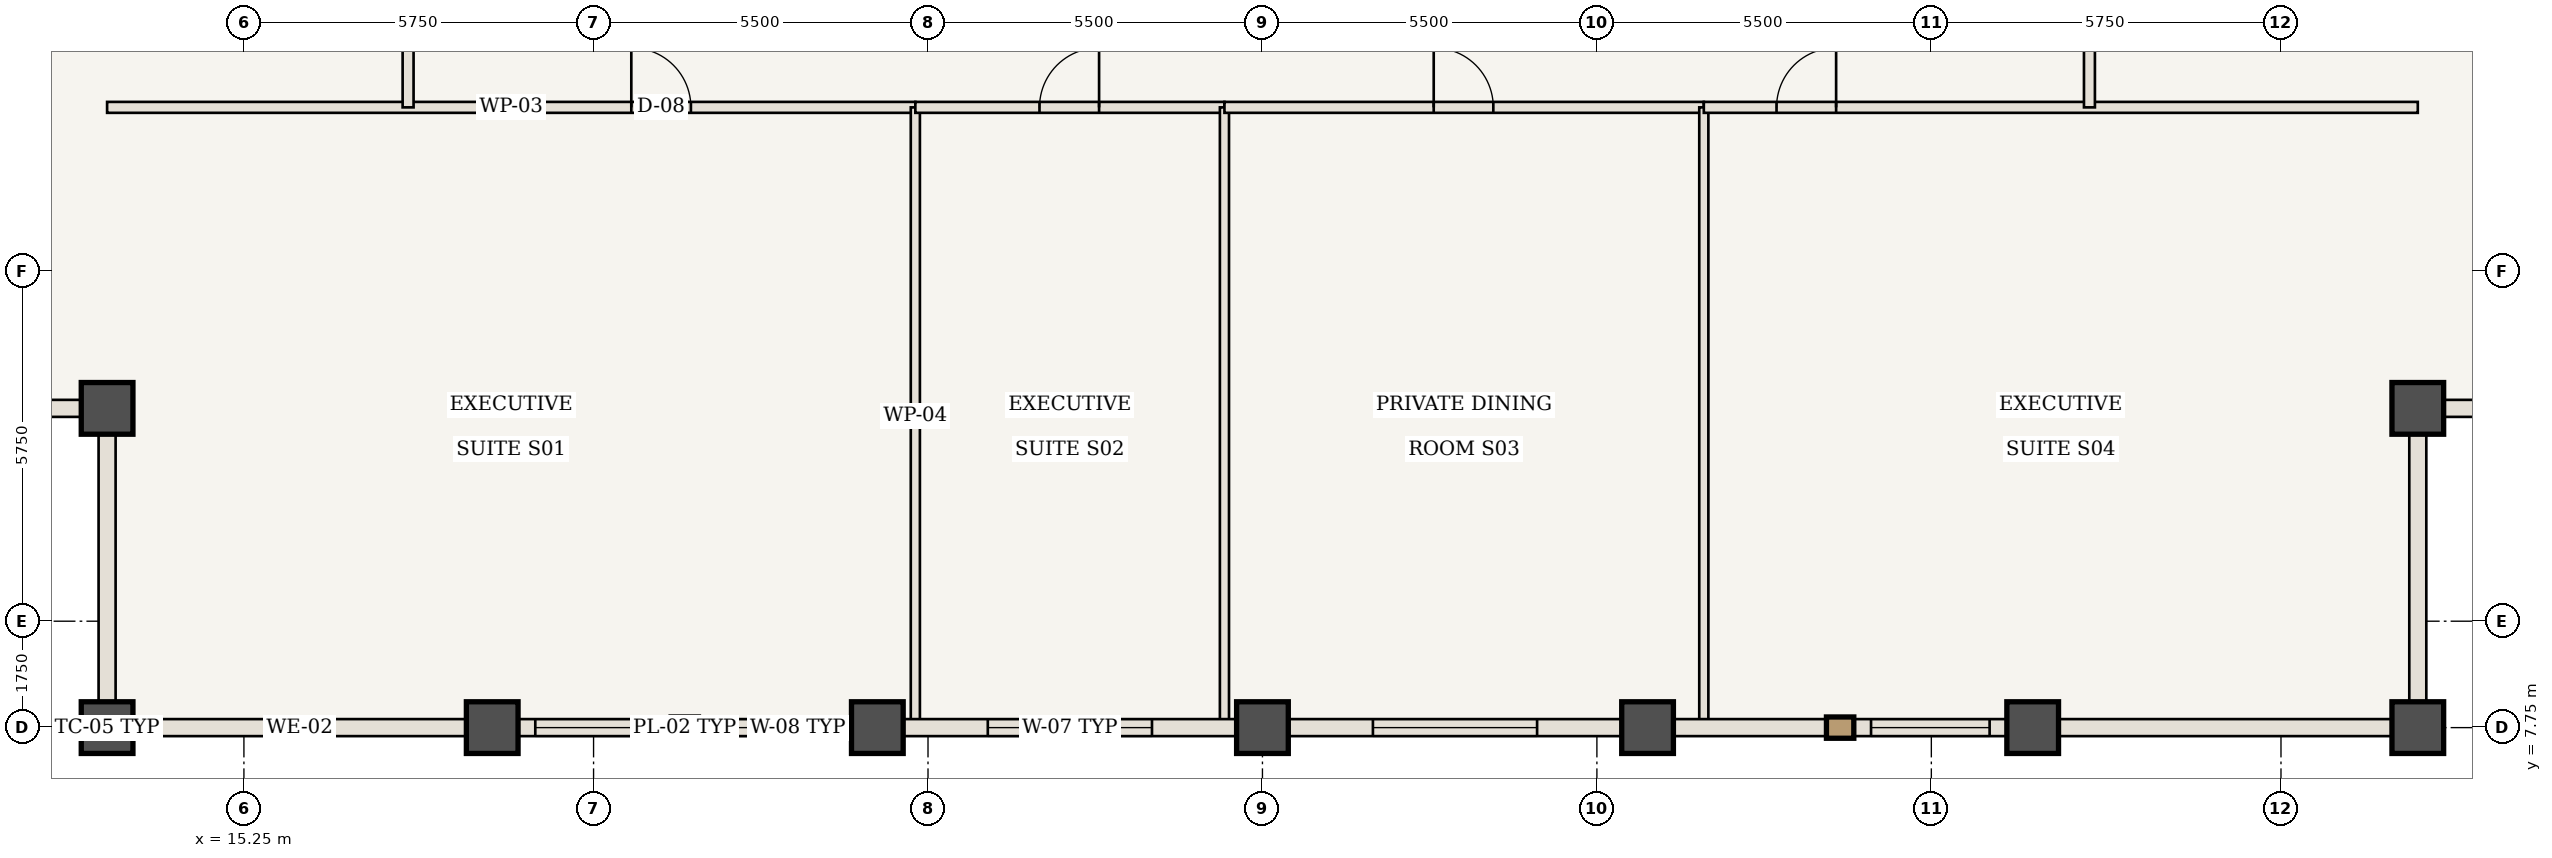
"""IFC4 building model, lengths in metres.
Left out: names, types, materials, properties, quantities, classifications, styles, units other than length and angle.
Written with IfcOpenShell. Run it as: python <this file> out.ifc"""

import sys

from ifc_helpers import new_model, si_unit, direction, frame, frame_2d, origin, origin_2d, place, context, subcontext, project, spatial, rectangle, extrude, element, fill, save


model = new_model("IFC4")
c1 = context("Model", 3, precision=1e-05, world=origin(), true_north=direction((0.0, 1.0)))
c2 = subcontext(c1, "Body", "Model", "MODEL_VIEW")
j1 = project(units=[si_unit("LENGTHUNIT", "METRE"), si_unit("PLANEANGLEUNIT", "RADIAN")], contexts=[c1])
p1 = place(None, origin())
s1 = spatial("IfcSite", under=j1, at=p1, CompositionType="ELEMENT")
p2 = place(p1, origin())
s2 = spatial("IfcBuilding", under=s1, at=p2, CompositionType="ELEMENT")
p3 = place(p2, frame((0.0, 0.0, 225.4)))
s3 = spatial("IfcBuildingStorey", under=s2, at=p3, CompositionType="ELEMENT", Elevation=225.4)
for number, where, z_axis, x_axis in (
    (1, (13.0, 7.75, 0.0), (0.0, 0.0, 1.0), (1.0, 0.0, 0.0)),
    (2, (13.0, 13.0, 0.0), (0.0, 0.0, 1.0), (1.0, 0.0, 0.0)),
    (3, (51.0, 7.75, 0.0), (0.0, 0.0, 1.0), (1.0, 0.0, 0.0)),
    (4, (51.0, 13.0, 0.0), (0.0, 0.0, 1.0), (1.0, 0.0, 0.0)),
    (5, (19.333, 7.75, 0.0), (0.0, 0.0, 1.0), (1.0, 0.0, 0.0)),
    (6, (25.667, 7.75, 0.0), (0.0, 0.0, 1.0), (1.0, 0.0, 0.0)),
    (7, (32.0, 7.75, 0.0), (0.0, 0.0, 1.0), (1.0, 0.0, 0.0)),
    (8, (38.333, 7.75, 0.0), (0.0, 0.0, 1.0), (1.0, 0.0, 0.0)),
    (9, (44.667, 7.75, 0.0), (0.0, 0.0, 1.0), (1.0, 0.0, 0.0)),
):
    element("IfcColumn", number, at=place(p3, frame(where, z_axis=z_axis, x_axis=x_axis)), inside=s3, PredefinedType="COLUMN", context=c2, shape_type="SweptSolid", body=[
        extrude(rectangle(XDim=0.85, YDim=0.85, at=origin_2d()), origin(), (0.0, 0.0, 1.0), 3.85),
    ])
p4 = place(p3, frame((13.0, 17.95, 0.0), z_axis=(0.0, 0.0, 1.0), x_axis=(1.0, 0.0, 0.0)))
e10 = element("IfcWall", 10, at=p4, inside=s3, PredefinedType="STANDARD", context=c2, shape_type="SweptSolid", body=[
    extrude(rectangle(XDim=13.292, YDim=0.18, at=frame_2d((6.646, 0.0))), origin(), (0.0, 0.0, 1.0), 3.685),
])
p5 = place(p4, frame((8.621, 0.0, 0.0)))
e11 = element("IfcOpeningElement", 11, at=p5, cuts=e10, PredefinedType="OPENING", context=c2, shape_type="SweptSolid", body=[
    extrude(rectangle(XDim=0.98, YDim=2.2, at=frame_2d((0.49, 1.1))), frame((0.0, 0.1, 0.0), z_axis=(0.0, -1.0, 0.0), x_axis=(1.0, 0.0, 0.0)), (0.0, 0.0, 1.0), 0.2),
])
p6 = place(p3, frame((26.292, 7.81, 0.0), z_axis=(0.0, 0.0, 1.0), x_axis=(0.0, 1.0, 0.0)))
e12 = element("IfcWall", 12, at=p6, inside=s3, PredefinedType="STANDARD", context=c2, shape_type="SweptSolid", body=[
    extrude(rectangle(XDim=10.14, YDim=0.15, at=frame_2d((5.07, 0.0))), origin(), (0.0, 0.0, 1.0), 3.685),
])
p7 = place(p3, frame((26.292, 17.95, 0.0), z_axis=(0.0, 0.0, 1.0), x_axis=(1.0, 0.0, 0.0)))
e13 = element("IfcWall", 13, at=p7, inside=s3, PredefinedType="STANDARD", context=c2, shape_type="SweptSolid", body=[
    extrude(rectangle(XDim=5.083, YDim=0.18, at=frame_2d((2.542, 0.0))), origin(), (0.0, 0.0, 1.0), 3.685),
])
p8 = place(p7, frame((2.042, 0.0, 0.0)))
e14 = element("IfcOpeningElement", 14, at=p8, cuts=e13, PredefinedType="OPENING", context=c2, shape_type="SweptSolid", body=[
    extrude(rectangle(XDim=0.98, YDim=2.2, at=frame_2d((0.49, 1.1))), frame((0.0, 0.1, 0.0), z_axis=(0.0, -1.0, 0.0), x_axis=(1.0, 0.0, 0.0)), (0.0, 0.0, 1.0), 0.2),
])
p9 = place(p3, frame((31.375, 7.81, 0.0), z_axis=(0.0, 0.0, 1.0), x_axis=(0.0, 1.0, 0.0)))
e15 = element("IfcWall", 15, at=p9, inside=s3, PredefinedType="STANDARD", context=c2, shape_type="SweptSolid", body=[
    extrude(rectangle(XDim=10.14, YDim=0.15, at=frame_2d((5.07, 0.0))), origin(), (0.0, 0.0, 1.0), 3.685),
])
p10 = place(p3, frame((31.375, 17.95, 0.0), z_axis=(0.0, 0.0, 1.0), x_axis=(1.0, 0.0, 0.0)))
e16 = element("IfcWall", 16, at=p10, inside=s3, PredefinedType="STANDARD", context=c2, shape_type="SweptSolid", body=[
    extrude(rectangle(XDim=7.883, YDim=0.18, at=frame_2d((3.942, 0.0))), origin(), (0.0, 0.0, 1.0), 3.685),
])
p11 = place(p10, frame((3.442, 0.0, 0.0)))
e17 = element("IfcOpeningElement", 17, at=p11, cuts=e16, PredefinedType="OPENING", context=c2, shape_type="SweptSolid", body=[
    extrude(rectangle(XDim=0.98, YDim=2.2, at=frame_2d((0.49, 1.1))), frame((0.0, 0.1, 0.0), z_axis=(0.0, -1.0, 0.0), x_axis=(1.0, 0.0, 0.0)), (0.0, 0.0, 1.0), 0.2),
])
p12 = place(p3, frame((39.258, 7.81, 0.0), z_axis=(0.0, 0.0, 1.0), x_axis=(0.0, 1.0, 0.0)))
e18 = element("IfcWall", 18, at=p12, inside=s3, PredefinedType="STANDARD", context=c2, shape_type="SweptSolid", body=[
    extrude(rectangle(XDim=10.14, YDim=0.15, at=frame_2d((5.07, 0.0))), origin(), (0.0, 0.0, 1.0), 3.685),
])
p13 = place(p3, frame((39.258, 17.95, 0.0), z_axis=(0.0, 0.0, 1.0), x_axis=(1.0, 0.0, 0.0)))
e19 = element("IfcWall", 19, at=p13, inside=s3, PredefinedType="STANDARD", context=c2, shape_type="SweptSolid", body=[
    extrude(rectangle(XDim=11.742, YDim=0.18, at=frame_2d((5.871, 0.0))), origin(), (0.0, 0.0, 1.0), 3.685),
])
p14 = place(p13, frame((1.196, 0.0, 0.0)))
e20 = element("IfcOpeningElement", 20, at=p14, cuts=e19, PredefinedType="OPENING", context=c2, shape_type="SweptSolid", body=[
    extrude(rectangle(XDim=0.98, YDim=2.2, at=frame_2d((0.49, 1.1))), frame((0.0, 0.1, 0.0), z_axis=(0.0, -1.0, 0.0), x_axis=(1.0, 0.0, 0.0)), (0.0, 0.0, 1.0), 0.2),
])
p15 = place(p3, frame((17.95, 17.95, 0.0), z_axis=(0.0, 0.0, 1.0), x_axis=(0.0, 1.0, 0.0)))
e21 = element("IfcWall", 21, at=p15, inside=s3, PredefinedType="STANDARD", context=c2, shape_type="SweptSolid", body=[
    extrude(rectangle(XDim=6.642, YDim=0.18, at=frame_2d((3.321, 0.0))), origin(), (0.0, 0.0, 1.0), 3.685),
])
p16 = place(p15, frame((4.271, 0.0, 0.0)))
e22 = element("IfcOpeningElement", 22, at=p16, cuts=e21, PredefinedType="OPENING", context=c2, shape_type="SweptSolid", body=[
    extrude(rectangle(XDim=0.98, YDim=2.2, at=frame_2d((0.49, 1.1))), frame((0.0, 0.1, 0.0), z_axis=(0.0, -1.0, 0.0), x_axis=(1.0, 0.0, 0.0)), (0.0, 0.0, 1.0), 0.2),
])
p17 = place(p3, frame((45.6, 17.95, 0.0), z_axis=(0.0, 0.0, 1.0), x_axis=(0.0, 1.0, 0.0)))
e23 = element("IfcWall", 23, at=p17, inside=s3, PredefinedType="STANDARD", context=c2, shape_type="SweptSolid", body=[
    extrude(rectangle(XDim=13.1, YDim=0.18, at=frame_2d((6.55, 0.0))), origin(), (0.0, 0.0, 1.0), 3.685),
])
p18 = place(p17, frame((6.05, 0.0, 0.0)))
e24 = element("IfcOpeningElement", 24, at=p18, cuts=e23, PredefinedType="OPENING", context=c2, shape_type="SweptSolid", body=[
    extrude(rectangle(XDim=0.98, YDim=2.2, at=frame_2d((0.49, 1.1))), frame((0.0, 0.1, 0.0), z_axis=(0.0, -1.0, 0.0), x_axis=(1.0, 0.0, 0.0)), (0.0, 0.0, 1.0), 0.2),
])
p19 = place(p3, frame((19.333, 7.75, 0.0), z_axis=(0.0, 0.0, 1.0), x_axis=(-1.0, 0.0, 0.0)))
e25 = element("IfcWall", 25, at=p19, inside=s3, PredefinedType="USERDEFINED", context=c2, shape_type="SweptSolid", body=[
    extrude(rectangle(XDim=6.333, YDim=0.28, at=frame_2d((3.167, 0.0))), origin(), (0.0, 0.0, 1.0), 2.985),
])
p20 = place(p3, frame((25.667, 7.75, 0.0), z_axis=(0.0, 0.0, 1.0), x_axis=(-1.0, 0.0, 0.0)))
e26 = element("IfcWall", 26, at=p20, inside=s3, PredefinedType="USERDEFINED", context=c2, shape_type="SweptSolid", body=[
    extrude(rectangle(XDim=6.333, YDim=0.28, at=frame_2d((3.167, 0.0))), origin(), (0.0, 0.0, 1.0), 2.985),
])
p21 = place(p20, frame((0.708, 0.0, 0.85)))
e27 = element("IfcOpeningElement", 27, at=p21, cuts=e26, PredefinedType="OPENING", context=c2, shape_type="SweptSolid", body=[
    extrude(rectangle(XDim=1.95, YDim=1.935, at=frame_2d((0.975, 0.968))), frame((0.0, 0.15, 0.0), z_axis=(0.0, -1.0, 0.0), x_axis=(1.0, 0.0, 0.0)), (0.0, 0.0, 1.0), 0.3),
])
p22 = place(p20, frame((3.675, 0.0, 0.85)))
e28 = element("IfcOpeningElement", 28, at=p22, cuts=e26, PredefinedType="OPENING", context=c2, shape_type="SweptSolid", body=[
    extrude(rectangle(XDim=1.95, YDim=1.935, at=frame_2d((0.975, 0.968))), frame((0.0, 0.15, 0.0), z_axis=(0.0, -1.0, 0.0), x_axis=(1.0, 0.0, 0.0)), (0.0, 0.0, 1.0), 0.3),
])
p23 = place(p3, frame((32.0, 7.75, 0.0), z_axis=(0.0, 0.0, 1.0), x_axis=(-1.0, 0.0, 0.0)))
e29 = element("IfcWall", 29, at=p23, inside=s3, PredefinedType="USERDEFINED", context=c2, shape_type="SweptSolid", body=[
    extrude(rectangle(XDim=6.333, YDim=0.28, at=frame_2d((3.167, 0.0))), origin(), (0.0, 0.0, 1.0), 2.985),
])
p24 = place(p23, frame((1.817, 0.0, 0.85)))
e30 = element("IfcOpeningElement", 30, at=p24, cuts=e29, PredefinedType="OPENING", context=c2, shape_type="SweptSolid", body=[
    extrude(rectangle(XDim=2.7, YDim=1.935, at=frame_2d((1.35, 0.968))), frame((0.0, 0.15, 0.0), z_axis=(0.0, -1.0, 0.0), x_axis=(1.0, 0.0, 0.0)), (0.0, 0.0, 1.0), 0.3),
])
p25 = place(p3, frame((38.333, 7.75, 0.0), z_axis=(0.0, 0.0, 1.0), x_axis=(-1.0, 0.0, 0.0)))
e31 = element("IfcWall", 31, at=p25, inside=s3, PredefinedType="USERDEFINED", context=c2, shape_type="SweptSolid", body=[
    extrude(rectangle(XDim=6.333, YDim=0.28, at=frame_2d((3.167, 0.0))), origin(), (0.0, 0.0, 1.0), 2.985),
])
p26 = place(p25, frame((1.817, 0.0, 0.85)))
e32 = element("IfcOpeningElement", 32, at=p26, cuts=e31, PredefinedType="OPENING", context=c2, shape_type="SweptSolid", body=[
    extrude(rectangle(XDim=2.7, YDim=1.935, at=frame_2d((1.35, 0.968))), frame((0.0, 0.15, 0.0), z_axis=(0.0, -1.0, 0.0), x_axis=(1.0, 0.0, 0.0)), (0.0, 0.0, 1.0), 0.3),
])
p27 = place(p3, frame((44.667, 7.75, 0.0), z_axis=(0.0, 0.0, 1.0), x_axis=(-1.0, 0.0, 0.0)))
e33 = element("IfcWall", 33, at=p27, inside=s3, PredefinedType="USERDEFINED", context=c2, shape_type="SweptSolid", body=[
    extrude(rectangle(XDim=6.333, YDim=0.28, at=frame_2d((3.167, 0.0))), origin(), (0.0, 0.0, 1.0), 2.985),
])
p28 = place(p27, frame((0.708, 0.0, 0.85)))
e34 = element("IfcOpeningElement", 34, at=p28, cuts=e33, PredefinedType="OPENING", context=c2, shape_type="SweptSolid", body=[
    extrude(rectangle(XDim=1.95, YDim=1.935, at=frame_2d((0.975, 0.968))), frame((0.0, 0.15, 0.0), z_axis=(0.0, -1.0, 0.0), x_axis=(1.0, 0.0, 0.0)), (0.0, 0.0, 1.0), 0.3),
])
p29 = place(p3, frame((51.0, 7.75, 0.0), z_axis=(0.0, 0.0, 1.0), x_axis=(-1.0, 0.0, 0.0)))
e35 = element("IfcWall", 35, at=p29, inside=s3, PredefinedType="USERDEFINED", context=c2, shape_type="SweptSolid", body=[
    extrude(rectangle(XDim=6.333, YDim=0.28, at=frame_2d((3.167, 0.0))), origin(), (0.0, 0.0, 1.0), 2.985),
])
for number, where, z_axis, x_axis in (
    (36, (13.0, 7.75, 0.0), (0.0, 0.0, 1.0), (0.0, 1.0, 0.0)),
    (37, (13.0, 13.0, 0.0), (0.0, 0.0, 1.0), (-1.0, 0.0, 0.0)),
    (38, (51.0, 13.0, 0.0), (0.0, 0.0, 1.0), (0.0, -1.0, 0.0)),
    (39, (56.25, 13.0, 0.0), (0.0, 0.0, 1.0), (-1.0, 0.0, 0.0)),
):
    element("IfcWall", number, at=place(p3, frame(where, z_axis=z_axis, x_axis=x_axis)), inside=s3, PredefinedType="USERDEFINED", context=c2, shape_type="SweptSolid", body=[
        extrude(rectangle(XDim=5.25, YDim=0.28, at=frame_2d((2.625, 0.0))), origin(), (0.0, 0.0, 1.0), 2.985),
    ])
p30 = place(p5, origin())
e40 = element("IfcDoor", 40, at=p30, inside=s3, OperationType="SINGLE_SWING_LEFT", PredefinedType="DOOR", context=c2, shape_type="SweptSolid", body=[
    extrude(rectangle(XDim=0.98, YDim=2.2, at=frame_2d((0.49, 1.1))), frame((0.0, 0.025, 0.0), z_axis=(0.0, -1.0, 0.0), x_axis=(1.0, 0.0, 0.0)), (0.0, 0.0, 1.0), 0.05),
])
fill(e11, e40)
p31 = place(p8, origin())
e41 = element("IfcDoor", 41, at=p31, inside=s3, OperationType="SINGLE_SWING_RIGHT", PredefinedType="DOOR", context=c2, shape_type="SweptSolid", body=[
    extrude(rectangle(XDim=0.98, YDim=2.2, at=frame_2d((0.49, 1.1))), frame((0.0, 0.025, 0.0), z_axis=(0.0, -1.0, 0.0), x_axis=(1.0, 0.0, 0.0)), (0.0, 0.0, 1.0), 0.05),
])
fill(e14, e41)
p32 = place(p11, origin())
e42 = element("IfcDoor", 42, at=p32, inside=s3, OperationType="SINGLE_SWING_LEFT", PredefinedType="DOOR", context=c2, shape_type="SweptSolid", body=[
    extrude(rectangle(XDim=0.98, YDim=2.2, at=frame_2d((0.49, 1.1))), frame((0.0, 0.025, 0.0), z_axis=(0.0, -1.0, 0.0), x_axis=(1.0, 0.0, 0.0)), (0.0, 0.0, 1.0), 0.05),
])
fill(e17, e42)
p33 = place(p14, origin())
e43 = element("IfcDoor", 43, at=p33, inside=s3, OperationType="SINGLE_SWING_RIGHT", PredefinedType="DOOR", context=c2, shape_type="SweptSolid", body=[
    extrude(rectangle(XDim=0.98, YDim=2.2, at=frame_2d((0.49, 1.1))), frame((0.0, 0.025, 0.0), z_axis=(0.0, -1.0, 0.0), x_axis=(1.0, 0.0, 0.0)), (0.0, 0.0, 1.0), 0.05),
])
fill(e20, e43)
p34 = place(p21, origin())
e44 = element("IfcWindow", 44, at=p34, inside=s3, PartitioningType="SINGLE_PANEL", PredefinedType="WINDOW", context=c2, shape_type="SweptSolid", body=[
    extrude(rectangle(XDim=1.95, YDim=1.935, at=frame_2d((0.975, 0.968))), frame((0.0, 0.03, 0.0), z_axis=(0.0, -1.0, 0.0), x_axis=(1.0, 0.0, 0.0)), (0.0, 0.0, 1.0), 0.06),
])
fill(e27, e44)
p35 = place(p22, origin())
e45 = element("IfcWindow", 45, at=p35, inside=s3, PartitioningType="SINGLE_PANEL", PredefinedType="WINDOW", context=c2, shape_type="SweptSolid", body=[
    extrude(rectangle(XDim=1.95, YDim=1.935, at=frame_2d((0.975, 0.968))), frame((0.0, 0.03, 0.0), z_axis=(0.0, -1.0, 0.0), x_axis=(1.0, 0.0, 0.0)), (0.0, 0.0, 1.0), 0.06),
])
fill(e28, e45)
p36 = place(p24, origin())
e46 = element("IfcWindow", 46, at=p36, inside=s3, PartitioningType="SINGLE_PANEL", PredefinedType="WINDOW", context=c2, shape_type="SweptSolid", body=[
    extrude(rectangle(XDim=2.7, YDim=1.935, at=frame_2d((1.35, 0.968))), frame((0.0, 0.03, 0.0), z_axis=(0.0, -1.0, 0.0), x_axis=(1.0, 0.0, 0.0)), (0.0, 0.0, 1.0), 0.06),
])
fill(e30, e46)
p37 = place(p26, origin())
e47 = element("IfcWindow", 47, at=p37, inside=s3, PartitioningType="SINGLE_PANEL", PredefinedType="WINDOW", context=c2, shape_type="SweptSolid", body=[
    extrude(rectangle(XDim=2.7, YDim=1.935, at=frame_2d((1.35, 0.968))), frame((0.0, 0.03, 0.0), z_axis=(0.0, -1.0, 0.0), x_axis=(1.0, 0.0, 0.0)), (0.0, 0.0, 1.0), 0.06),
])
fill(e32, e47)
p38 = place(p28, origin())
e48 = element("IfcWindow", 48, at=p38, inside=s3, PartitioningType="SINGLE_PANEL", PredefinedType="WINDOW", context=c2, shape_type="SweptSolid", body=[
    extrude(rectangle(XDim=1.95, YDim=1.935, at=frame_2d((0.975, 0.968))), frame((0.0, 0.03, 0.0), z_axis=(0.0, -1.0, 0.0), x_axis=(1.0, 0.0, 0.0)), (0.0, 0.0, 1.0), 0.06),
])
fill(e34, e48)
save(model, sys.argv[1])
